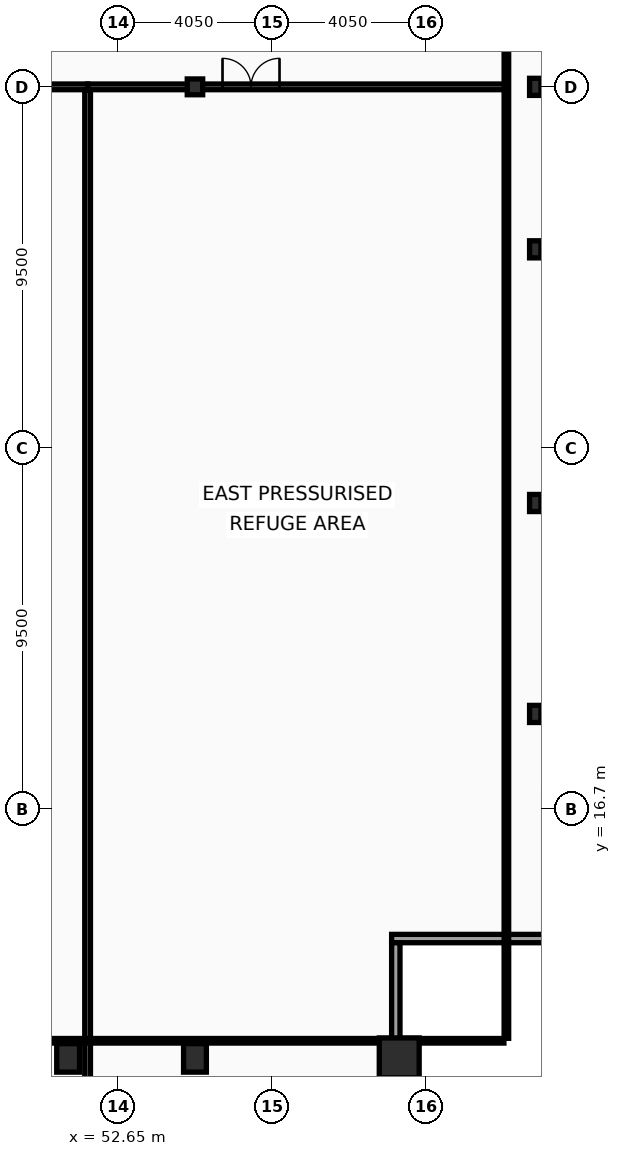
"""IFC4 building model, lengths in metres.
Left out: names, types, materials, properties, quantities, classifications, styles, units other than length and angle.
Written with IfcOpenShell. Run it as: python <this file> out.ifc"""

import sys

from ifc_helpers import new_model, si_unit, direction, frame, frame_2d, origin, origin_2d, place, context, subcontext, project, spatial, rectangle, hollow_rectangle, i_section, extrude, element, fill, save


model = new_model("IFC4")
c1 = context("Model", 3, precision=1e-05, world=origin(), true_north=direction((0.0, 1.0)))
c2 = subcontext(c1, "Body", "Model", "MODEL_VIEW")
j1 = project(units=[si_unit("LENGTHUNIT", "METRE"), si_unit("PLANEANGLEUNIT", "RADIAN")], contexts=[c1])
p1 = place(None, origin())
s1 = spatial("IfcSite", under=j1, at=p1, CompositionType="ELEMENT")
p2 = place(p1, origin())
s2 = spatial("IfcBuilding", under=s1, at=p2, CompositionType="ELEMENT")
p3 = place(p2, frame((0.0, 0.0, 257.0)))
s3 = spatial("IfcBuildingStorey", under=s2, at=p3, CompositionType="ELEMENT", Elevation=257.0)
p4 = place(p3, frame((60.05, 10.15, 0.0), z_axis=(0.0, 0.0, 1.0), x_axis=(1.0, 0.0, 0.0)))
e1 = element("IfcColumn", 1, at=p4, inside=s3, PredefinedType="COLUMN", context=c2, shape_type="SweptSolid", body=[
    extrude(hollow_rectangle(XDim=1.05, YDim=1.05, WallThickness=0.055, at=origin_2d()), origin(), (0.0, 0.0, 1.0), 4.8),
])
for number, where, z_axis, x_axis in (
    (2, (51.337, 10.15, 0.0), (0.0, 0.0, 1.0), (1.0, 0.0, 0.0)),
    (3, (54.675, 10.15, 0.0), (0.0, 0.0, 1.0), (1.0, 0.0, 0.0)),
):
    element("IfcColumn", number, at=place(p3, frame(where, z_axis=z_axis, x_axis=x_axis)), inside=s3, PredefinedType="COLUMN", context=c2, shape_type="SweptSolid", body=[
        extrude(hollow_rectangle(XDim=0.6, YDim=0.75, WallThickness=0.045, at=origin_2d()), origin(), (0.0, 0.0, 1.0), 4.8),
    ])
for number, where, z_axis, x_axis in (
    (4, (63.63, 19.2, 0.0), (0.0, 0.0, 1.0), (1.0, 0.0, 0.0)),
    (5, (63.63, 24.75, 0.0), (0.0, 0.0, 1.0), (1.0, 0.0, 0.0)),
    (6, (63.63, 31.425, 0.0), (0.0, 0.0, 1.0), (1.0, 0.0, 0.0)),
    (7, (63.63, 35.7, 0.0), (0.0, 0.0, 1.0), (1.0, 0.0, 0.0)),
):
    element("IfcColumn", number, at=place(p3, frame(where, z_axis=z_axis, x_axis=x_axis)), inside=s3, PredefinedType="COLUMN", context=c2, shape_type="SweptSolid", body=[
        extrude(i_section(OverallWidth=0.3, OverallDepth=0.45, WebThickness=0.014, FlangeThickness=0.026, at=origin_2d()), origin(), (0.0, 0.0, 1.0), 4.8),
    ])
p5 = place(p3, frame((54.675, 35.7, 0.0), z_axis=(0.0, 0.0, 1.0), x_axis=(1.0, 0.0, 0.0)))
e8 = element("IfcColumn", 8, at=p5, inside=s3, PredefinedType="COLUMN", context=c2, shape_type="SweptSolid", body=[
    extrude(i_section(OverallWidth=0.406, OverallDepth=0.416, WebThickness=0.03, FlangeThickness=0.048, at=origin_2d()), origin(), (0.0, 0.0, 1.0), 4.8),
])
p6 = place(p3, frame((64.07, 13.29, 0.0), z_axis=(0.0, 0.0, 1.0), x_axis=(-1.0, 0.0, 0.0)))
e9 = element("IfcWall", 9, at=p6, inside=s3, PredefinedType="SOLIDWALL", context=c2, shape_type="SweptSolid", body=[
    extrude(rectangle(XDim=4.22, YDim=0.22, at=frame_2d((2.11, 0.0))), origin(), (0.0, 0.0, 1.0), 4.03),
])
p7 = place(p3, frame((59.96, 13.18, 0.0), z_axis=(0.0, 0.0, 1.0), x_axis=(0.0, -1.0, 0.0)))
e10 = element("IfcWall", 10, at=p7, inside=s3, PredefinedType="SOLIDWALL", context=c2, shape_type="SweptSolid", body=[
    extrude(rectangle(XDim=3.91, YDim=0.22, at=frame_2d((1.955, 0.0))), origin(), (0.0, 0.0, 1.0), 4.03),
])
p8 = place(p3, frame((47.45, 35.7, 0.0), z_axis=(0.0, 0.0, 1.0), x_axis=(1.0, 0.0, 0.0)))
e11 = element("IfcWall", 11, at=p8, inside=s3, PredefinedType="PARTITIONING", context=c2, shape_type="SweptSolid", body=[
    extrude(rectangle(XDim=4.4, YDim=0.15, at=frame_2d((2.2, 0.0))), origin(), (0.0, 0.0, 1.0), 3.98),
])
p9 = place(p3, frame((51.85, 35.7, 0.0), z_axis=(0.0, 0.0, 1.0), x_axis=(1.0, 0.0, 0.0)))
e12 = element("IfcWall", 12, at=p9, inside=s3, PredefinedType="PARTITIONING", context=c2, shape_type="SweptSolid", body=[
    extrude(rectangle(XDim=11.02, YDim=0.15, at=frame_2d((5.51, 0.0))), origin(), (0.0, 0.0, 1.0), 3.98),
])
p10 = place(p9, frame((3.55, 0.0, 0.0)))
e13 = element("IfcOpeningElement", 13, at=p10, cuts=e12, PredefinedType="OPENING", context=c2, shape_type="SweptSolid", body=[
    extrude(rectangle(XDim=1.5, YDim=2.15, at=frame_2d((0.75, 1.075))), frame((0.0, 0.085, 0.0), z_axis=(0.0, -1.0, 0.0), x_axis=(1.0, 0.0, 0.0)), (0.0, 0.0, 1.0), 0.17),
])
p11 = place(p3, frame((51.85, 9.32, 0.0), z_axis=(0.0, 0.0, 1.0), x_axis=(0.0, 1.0, 0.0)))
e14 = element("IfcWall", 14, at=p11, inside=s3, PredefinedType="PARTITIONING", context=c2, shape_type="SweptSolid", body=[
    extrude(rectangle(XDim=26.3, YDim=0.15, at=frame_2d((13.15, 0.0))), origin(), (0.0, 0.0, 1.0), 3.83),
])
p12 = place(p3, frame((62.87, 10.665, 0.0), z_axis=(0.0, 0.0, 1.0), x_axis=(0.0, 1.0, 0.0)))
e15 = element("IfcWall", 15, at=p12, inside=s3, PredefinedType="PARTITIONING", context=c2, shape_type="SweptSolid", body=[
    extrude(rectangle(XDim=42.11, YDim=0.12, at=frame_2d((21.055, 0.0))), origin(), (0.0, 0.0, 1.0), 3.98),
])
p13 = place(p3, frame((10.095, 10.6, 0.0), z_axis=(0.0, 0.0, 1.0), x_axis=(1.0, 0.0, 0.0)))
e16 = element("IfcWall", 16, at=p13, inside=s3, PredefinedType="PARTITIONING", context=c2, shape_type="SweptSolid", body=[
    extrude(rectangle(XDim=52.71, YDim=0.12, at=frame_2d((26.355, 0.0))), origin(), (0.0, 0.0, 1.0), 3.98),
])
p14 = place(p10, origin())
e17 = element("IfcDoor", 17, at=p14, inside=s3, OperationType="DOUBLE_DOOR_SINGLE_SWING", PredefinedType="DOOR", context=c2, shape_type="SweptSolid", body=[
    extrude(rectangle(XDim=1.5, YDim=2.15, at=frame_2d((0.75, 1.075))), frame((0.0, 0.025, 0.0), z_axis=(0.0, -1.0, 0.0), x_axis=(1.0, 0.0, 0.0)), (0.0, 0.0, 1.0), 0.05),
])
fill(e13, e17)
save(model, sys.argv[1])
